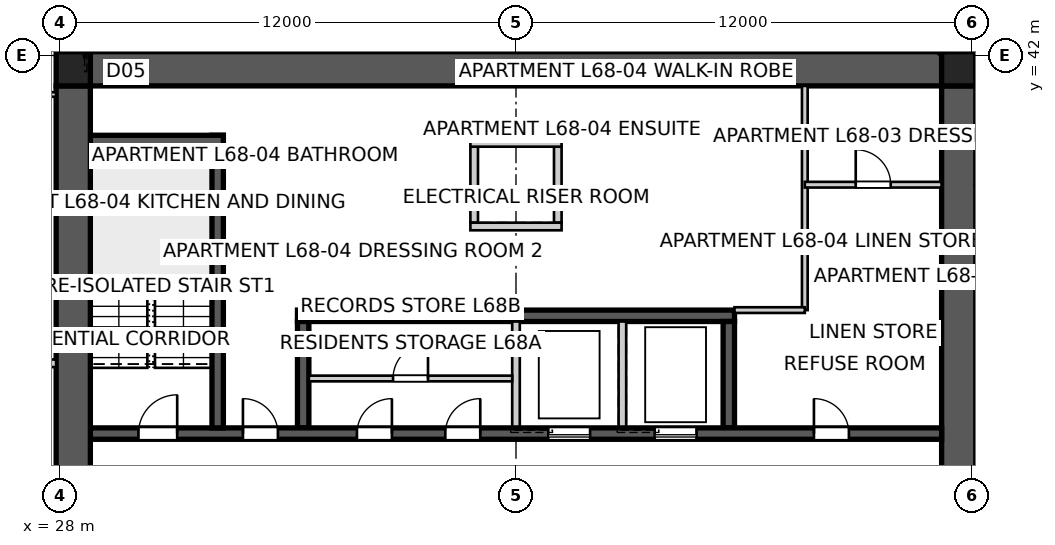
"""IFC4 building model, lengths in metres.
Left out: names, types, materials, properties, quantities, classifications, styles, units other than length and angle.
Written with IfcOpenShell. Run it as: python <this file> out.ifc"""

import sys

from ifc_helpers import new_model, si_unit, direction, frame, frame_2d, origin, origin_2d, place, context, subcontext, project, spatial, polyline, rectangle, outline, extrude, element, fill, save


model = new_model("IFC4")
c1 = context("Model", 3, precision=1e-05, world=origin(), true_north=direction((0.0, 1.0)))
c2 = subcontext(c1, "Body", "Model", "MODEL_VIEW")
j1 = project(units=[si_unit("LENGTHUNIT", "METRE"), si_unit("PLANEANGLEUNIT", "RADIAN")], contexts=[c1])
p1 = place(None, origin())
s1 = spatial("IfcSite", under=j1, at=p1, CompositionType="ELEMENT")
p2 = place(p1, origin())
s2 = spatial("IfcBuilding", under=s1, at=p2, CompositionType="ELEMENT")
p3 = place(p2, frame((0.0, 0.0, 247.2)))
s3 = spatial("IfcBuildingStorey", under=s2, at=p3, CompositionType="ELEMENT", Elevation=247.2)
p4 = place(p3, frame((28.8, 41.65, 0.0), z_axis=(0.0, 0.0, 1.0), x_axis=(1.0, 0.0, 0.0)))
e1 = element("IfcWall", 1, at=p4, inside=s3, PredefinedType="SHEAR", context=c2, shape_type="SweptSolid", body=[
    extrude(outline(polyline([(0.0, -0.45), (22.4, -0.45), (22.4, -0.025), (22.85, -0.025), (22.85, 0.025), (22.4, 0.025), (22.4, 0.45), (0.0, 0.45), (0.0, 0.025), (-0.45, 0.025), (-0.45, -0.025), (0.0, -0.025), (0.0, -0.45)])), origin(), (0.0, 0.0, 1.0), 3.4),
])
p5 = place(p3, frame((51.65, 18.8, 0.0), z_axis=(0.0, 0.0, 1.0), x_axis=(0.0, 1.0, 0.0)))
e2 = element("IfcWall", 2, at=p5, inside=s3, PredefinedType="SHEAR", context=c2, shape_type="SweptSolid", body=[
    extrude(outline(polyline([(0.0, -0.45), (22.4, -0.45), (22.4, -0.025), (22.85, -0.025), (22.85, 0.025), (22.4, 0.025), (22.4, 0.45), (0.0, 0.45), (0.0, 0.025), (-0.45, 0.025), (-0.45, -0.025), (0.0, -0.025), (0.0, -0.45)])), origin(), (0.0, 0.0, 1.0), 3.4),
])
p6 = place(p5, frame((11.14, 0.0, 0.0)))
e3 = element("IfcOpeningElement", 3, at=p6, cuts=e2, PredefinedType="OPENING", context=c2, shape_type="SweptSolid", body=[
    extrude(rectangle(XDim=1.02, YDim=2.4, at=frame_2d((0.51, 1.2))), frame((0.0, 0.46, 0.0), z_axis=(0.0, -1.0, 0.0), x_axis=(1.0, 0.0, 0.0)), (0.0, 0.0, 1.0), 0.92),
])
p7 = place(p3, frame((28.35, 41.2, 0.0), z_axis=(0.0, 0.0, 1.0), x_axis=(0.0, -1.0, 0.0)))
e4 = element("IfcWall", 4, at=p7, inside=s3, PredefinedType="SHEAR", context=c2, shape_type="SweptSolid", body=[
    extrude(outline(polyline([(0.0, -0.45), (22.4, -0.45), (22.4, -0.025), (22.85, -0.025), (22.85, 0.025), (22.4, 0.025), (22.4, 0.45), (0.0, 0.45), (0.0, 0.025), (-0.45, 0.025), (-0.45, -0.025), (0.0, -0.025), (0.0, -0.45)])), origin(), (0.0, 0.0, 1.0), 3.4),
])
p8 = place(p7, frame((11.14, 0.0, 0.0)))
e5 = element("IfcOpeningElement", 5, at=p8, cuts=e4, PredefinedType="OPENING", context=c2, shape_type="SweptSolid", body=[
    extrude(rectangle(XDim=1.02, YDim=2.4, at=frame_2d((0.51, 1.2))), frame((0.0, 0.46, 0.0), z_axis=(0.0, -1.0, 0.0), x_axis=(1.0, 0.0, 0.0)), (0.0, 0.0, 1.0), 0.92),
])
p9 = place(p3, frame((28.8, 32.05, 0.0), z_axis=(0.0, 0.0, 1.0), x_axis=(1.0, 0.0, 0.0)))
e6 = element("IfcWall", 6, at=p9, inside=s3, PredefinedType="SHEAR", context=c2, shape_type="SweptSolid", body=[
    extrude(rectangle(XDim=22.4, YDim=0.3, at=frame_2d((11.2, 0.0))), origin(), (0.0, 0.0, 1.0), 3.4),
])
p10 = place(p9, frame((19.04, 0.0, 0.0)))
e7 = element("IfcOpeningElement", 7, at=p10, cuts=e6, PredefinedType="OPENING", context=c2, shape_type="SweptSolid", body=[
    extrude(rectangle(XDim=0.92, YDim=2.1, at=frame_2d((0.46, 1.05))), frame((0.0, 0.16, 0.0), z_axis=(0.0, -1.0, 0.0), x_axis=(1.0, 0.0, 0.0)), (0.0, 0.0, 1.0), 0.32),
])
p11 = place(p9, frame((1.265, 0.0, 0.0)))
e8 = element("IfcOpeningElement", 8, at=p11, cuts=e6, PredefinedType="OPENING", context=c2, shape_type="SweptSolid", body=[
    extrude(rectangle(XDim=1.02, YDim=2.1, at=frame_2d((0.51, 1.05))), frame((0.0, 0.16, 0.0), z_axis=(0.0, -1.0, 0.0), x_axis=(1.0, 0.0, 0.0)), (0.0, 0.0, 1.0), 0.32),
])
p12 = place(p9, frame((4.015, 0.0, 0.0)))
e9 = element("IfcOpeningElement", 9, at=p12, cuts=e6, PredefinedType="OPENING", context=c2, shape_type="SweptSolid", body=[
    extrude(rectangle(XDim=0.92, YDim=2.1, at=frame_2d((0.46, 1.05))), frame((0.0, 0.16, 0.0), z_axis=(0.0, -1.0, 0.0), x_axis=(1.0, 0.0, 0.0)), (0.0, 0.0, 1.0), 0.32),
])
p13 = place(p9, frame((7.015, 0.0, 0.0)))
e10 = element("IfcOpeningElement", 10, at=p13, cuts=e6, PredefinedType="OPENING", context=c2, shape_type="SweptSolid", body=[
    extrude(rectangle(XDim=0.92, YDim=2.1, at=frame_2d((0.46, 1.05))), frame((0.0, 0.16, 0.0), z_axis=(0.0, -1.0, 0.0), x_axis=(1.0, 0.0, 0.0)), (0.0, 0.0, 1.0), 0.32),
])
p14 = place(p9, frame((9.34, 0.0, 0.0)))
e11 = element("IfcOpeningElement", 11, at=p14, cuts=e6, PredefinedType="OPENING", context=c2, shape_type="SweptSolid", body=[
    extrude(rectangle(XDim=0.92, YDim=2.1, at=frame_2d((0.46, 1.05))), frame((0.0, 0.16, 0.0), z_axis=(0.0, -1.0, 0.0), x_axis=(1.0, 0.0, 0.0)), (0.0, 0.0, 1.0), 0.32),
])
p15 = place(p9, frame((12.05, 0.0, 0.0)))
e12 = element("IfcOpeningElement", 12, at=p15, cuts=e6, PredefinedType="OPENING", context=c2, shape_type="SweptSolid", body=[
    extrude(rectangle(XDim=1.1, YDim=2.1, at=frame_2d((0.55, 1.05))), frame((0.0, 0.16, 0.0), z_axis=(0.0, -1.0, 0.0), x_axis=(1.0, 0.0, 0.0)), (0.0, 0.0, 1.0), 0.32),
])
p16 = place(p9, frame((14.85, 0.0, 0.0)))
e13 = element("IfcOpeningElement", 13, at=p16, cuts=e6, PredefinedType="OPENING", context=c2, shape_type="SweptSolid", body=[
    extrude(rectangle(XDim=1.1, YDim=2.1, at=frame_2d((0.55, 1.05))), frame((0.0, 0.16, 0.0), z_axis=(0.0, -1.0, 0.0), x_axis=(1.0, 0.0, 0.0)), (0.0, 0.0, 1.0), 0.32),
])
p17 = place(p3, frame((34.25, 35.15, 0.0), z_axis=(0.0, 0.0, 1.0), x_axis=(1.0, 0.0, 0.0)))
e14 = element("IfcWall", 14, at=p17, inside=s3, PredefinedType="SHEAR", context=c2, shape_type="SweptSolid", body=[
    extrude(rectangle(XDim=11.5, YDim=0.3, at=frame_2d((5.75, 0.0))), origin(), (0.0, 0.0, 1.0), 3.4),
])
p18 = place(p3, frame((34.4, 32.2, 0.0), z_axis=(0.0, 0.0, 1.0), x_axis=(0.0, 1.0, 0.0)))
e15 = element("IfcWall", 15, at=p18, inside=s3, PredefinedType="SHEAR", context=c2, shape_type="SweptSolid", body=[
    extrude(rectangle(XDim=2.8, YDim=0.3, at=frame_2d((1.4, 0.0))), origin(), (0.0, 0.0, 1.0), 3.4),
])
for number, where, z_axis, x_axis in (
    (16, (40.0, 32.2, 0.0), (0.0, 0.0, 1.0), (0.0, 1.0, 0.0)),
    (17, (42.8, 32.2, 0.0), (0.0, 0.0, 1.0), (0.0, 1.0, 0.0)),
):
    element("IfcWall", number, at=place(p3, frame(where, z_axis=z_axis, x_axis=x_axis)), inside=s3, PredefinedType="SOLIDWALL", context=c2, shape_type="SweptSolid", body=[
        extrude(rectangle(XDim=2.8, YDim=0.2, at=frame_2d((1.4, 0.0))), origin(), (0.0, 0.0, 1.0), 3.4),
    ])
p19 = place(p3, frame((45.6, 32.2, 0.0), z_axis=(0.0, 0.0, 1.0), x_axis=(0.0, 1.0, 0.0)))
e18 = element("IfcWall", 18, at=p19, inside=s3, PredefinedType="SHEAR", context=c2, shape_type="SweptSolid", body=[
    extrude(rectangle(XDim=2.8, YDim=0.3, at=frame_2d((1.4, 0.0))), origin(), (0.0, 0.0, 1.0), 3.4),
])
p20 = place(p3, frame((32.15, 32.2, 0.0), z_axis=(0.0, 0.0, 1.0), x_axis=(0.0, 1.0, 0.0)))
e19 = element("IfcWall", 19, at=p20, inside=s3, PredefinedType="SHEAR", context=c2, shape_type="SweptSolid", body=[
    extrude(rectangle(XDim=7.7, YDim=0.3, at=frame_2d((3.85, 0.0))), origin(), (0.0, 0.0, 1.0), 3.4),
])
p21 = place(p3, frame((28.8, 39.75, 0.0), z_axis=(0.0, 0.0, 1.0), x_axis=(1.0, 0.0, 0.0)))
e20 = element("IfcWall", 20, at=p21, inside=s3, PredefinedType="SHEAR", context=c2, shape_type="SweptSolid", body=[
    extrude(rectangle(XDim=3.5, YDim=0.3, at=frame_2d((1.75, 0.0))), origin(), (0.0, 0.0, 1.0), 3.4),
])
for number, where, z_axis, x_axis in (
    (21, (38.9, 37.6, 0.0), (0.0, 0.0, 1.0), (0.0, 1.0, 0.0)),
    (22, (41.1, 37.6, 0.0), (0.0, 0.0, 1.0), (0.0, 1.0, 0.0)),
):
    element("IfcWall", number, at=place(p3, frame(where, z_axis=z_axis, x_axis=x_axis)), inside=s3, PredefinedType="SOLIDWALL", context=c2, shape_type="SweptSolid", body=[
        extrude(rectangle(XDim=2.0, YDim=0.2, at=frame_2d((1.0, 0.0))), origin(), (0.0, 0.0, 1.0), 3.4),
    ])
for number, where, z_axis, x_axis in (
    (23, (38.8, 37.5, 0.0), (0.0, 0.0, 1.0), (1.0, 0.0, 0.0)),
    (24, (38.8, 39.7, 0.0), (0.0, 0.0, 1.0), (1.0, 0.0, 0.0)),
):
    element("IfcWall", number, at=place(p3, frame(where, z_axis=z_axis, x_axis=x_axis)), inside=s3, PredefinedType="SOLIDWALL", context=c2, shape_type="SweptSolid", body=[
        extrude(rectangle(XDim=2.4, YDim=0.2, at=frame_2d((1.2, 0.0))), origin(), (0.0, 0.0, 1.0), 3.4),
    ])
for number, where, z_axis, x_axis in (
    (25, (51.65, 41.65, 0.0), (0.0, 0.0, 1.0), (1.0, 0.0, 0.0)),
    (26, (28.35, 41.65, 0.0), (0.0, 0.0, 1.0), (1.0, 0.0, 0.0)),
):
    element("IfcColumn", number, at=place(p3, frame(where, z_axis=z_axis, x_axis=x_axis)), inside=s3, PredefinedType="COLUMN", context=c2, shape_type="SweptSolid", body=[
        extrude(rectangle(XDim=0.9, YDim=0.9, at=origin_2d()), origin(), (0.0, 0.0, 1.0), 3.4),
    ])
p22 = place(p3, frame((27.9, 33.9, 0.0), z_axis=(0.0, 0.0, 1.0), x_axis=(-1.0, 0.0, 0.0)))
e27 = element("IfcWall", 27, at=p22, inside=s3, PredefinedType="PARTITIONING", context=c2, shape_type="SweptSolid", body=[
    extrude(rectangle(XDim=2.5, YDim=0.2, at=frame_2d((1.25, 0.0))), origin(), (0.0, 0.0, 1.0), 3.25),
])
p23 = place(p3, frame((57.612, 42.332, 0.0), z_axis=(0.0, 0.0, 1.0), x_axis=(-0.819161528122, -0.573562891796, 0.0)))
e28 = element("IfcWall", 28, at=p23, inside=s3, PredefinedType="PARTITIONING", context=c2, shape_type="SweptSolid", body=[
    extrude(rectangle(XDim=6.681, YDim=0.25, at=frame_2d((3.341, 0.0))), origin(), (0.0, 0.0, 1.0), 3.25),
])
p24 = place(p3, frame((47.6, 41.2, 0.0), z_axis=(0.0, 0.0, 1.0), x_axis=(0.0, -1.0, 0.0)))
e29 = element("IfcWall", 29, at=p24, inside=s3, PredefinedType="SOLIDWALL", context=c2, shape_type="SweptSolid", body=[
    extrude(rectangle(XDim=5.9, YDim=0.15, at=frame_2d((2.95, 0.0))), origin(), (0.0, 0.0, 1.0), 3.25),
])
p25 = place(p3, frame((47.6, 35.3, 0.0), z_axis=(0.0, 0.0, 1.0), x_axis=(-1.0, 0.0, 0.0)))
e30 = element("IfcWall", 30, at=p25, inside=s3, PredefinedType="SOLIDWALL", context=c2, shape_type="SweptSolid", body=[
    extrude(rectangle(XDim=1.85, YDim=0.15, at=frame_2d((0.925, 0.0))), origin(), (0.0, 0.0, 1.0), 3.25),
])
p26 = place(p3, frame((47.6, 38.6, 0.0), z_axis=(0.0, 0.0, 1.0), x_axis=(1.0, 0.0, 0.0)))
e31 = element("IfcWall", 31, at=p26, inside=s3, PredefinedType="SOLIDWALL", context=c2, shape_type="SweptSolid", body=[
    extrude(rectangle(XDim=3.6, YDim=0.15, at=frame_2d((1.8, 0.0))), origin(), (0.0, 0.0, 1.0), 3.25),
])
p27 = place(p26, frame((1.34, 0.0, 0.0)))
e32 = element("IfcOpeningElement", 32, at=p27, cuts=e31, PredefinedType="OPENING", context=c2, shape_type="SweptSolid", body=[
    extrude(rectangle(XDim=0.92, YDim=2.1, at=frame_2d((0.46, 1.05))), frame((0.0, 0.085, 0.0), z_axis=(0.0, -1.0, 0.0), x_axis=(1.0, 0.0, 0.0)), (0.0, 0.0, 1.0), 0.17),
])
p28 = place(p3, frame((23.0, 36.145, 0.0), z_axis=(0.0, 0.0, 1.0), x_axis=(1.0, 0.0, 0.0)))
e33 = element("IfcWall", 33, at=p28, inside=s3, PredefinedType="PARTITIONING", context=c2, shape_type="SweptSolid", body=[
    extrude(rectangle(XDim=4.9, YDim=0.12, at=frame_2d((2.45, 0.0))), origin(), (0.0, 0.0, 1.0), 3.25),
])
p29 = place(p28, frame((1.99, 0.0, 0.0)))
e34 = element("IfcOpeningElement", 34, at=p29, cuts=e33, PredefinedType="OPENING", context=c2, shape_type="SweptSolid", body=[
    extrude(rectangle(XDim=0.92, YDim=2.34, at=frame_2d((0.46, 1.17))), frame((0.0, 0.07, 0.0), z_axis=(0.0, -1.0, 0.0), x_axis=(1.0, 0.0, 0.0)), (0.0, 0.0, 1.0), 0.14),
])
p30 = place(p3, frame((23.0, 40.974, 0.0), z_axis=(0.0, 0.0, 1.0), x_axis=(1.0, 0.0, 0.0)))
e35 = element("IfcWall", 35, at=p30, inside=s3, PredefinedType="PARTITIONING", context=c2, shape_type="SweptSolid", body=[
    extrude(rectangle(XDim=4.9, YDim=0.12, at=frame_2d((2.45, 0.0))), origin(), (0.0, 0.0, 1.0), 3.25),
])
p31 = place(p30, frame((1.97, 0.0, 0.0)))
e36 = element("IfcOpeningElement", 36, at=p31, cuts=e35, PredefinedType="OPENING", context=c2, shape_type="SweptSolid", body=[
    extrude(rectangle(XDim=0.96, YDim=2.1, at=frame_2d((0.48, 1.05))), frame((0.0, 0.07, 0.0), z_axis=(0.0, -1.0, 0.0), x_axis=(1.0, 0.0, 0.0)), (0.0, 0.0, 1.0), 0.14),
])
p32 = place(p3, frame((28.708, 41.18, 0.0), z_axis=(0.0, 0.0, 1.0), x_axis=(0.0, 1.0, 0.0)))
e37 = element("IfcWall", 37, at=p32, inside=s3, PredefinedType="PARTITIONING", context=c2, shape_type="SweptSolid", body=[
    extrude(rectangle(XDim=2.458, YDim=0.12, at=frame_2d((1.229, 0.0))), origin(), (0.0, 0.0, 1.0), 3.25),
])
p33 = place(p32, frame((1.259, 0.0, 0.0)))
e38 = element("IfcOpeningElement", 38, at=p33, cuts=e37, PredefinedType="OPENING", context=c2, shape_type="SweptSolid", body=[
    extrude(rectangle(XDim=0.96, YDim=2.1, at=frame_2d((0.48, 1.05))), frame((0.0, 0.07, 0.0), z_axis=(0.0, -1.0, 0.0), x_axis=(1.0, 0.0, 0.0)), (0.0, 0.0, 1.0), 0.14),
])
p34 = place(p3, frame((55.537, 45.226, 0.0), z_axis=(0.0, 0.0, 1.0), x_axis=(-0.819158250207, -0.573567573279, 0.0)))
e39 = element("IfcWall", 39, at=p34, inside=s3, PredefinedType="SOLIDWALL", context=c2, shape_type="SweptSolid", body=[
    extrude(rectangle(XDim=5.45, YDim=0.15, at=frame_2d((2.725, 0.0))), origin(), (0.0, 0.0, 1.0), 3.25),
])
p35 = place(p34, frame((2.245, 0.0, 0.0)))
e40 = element("IfcOpeningElement", 40, at=p35, cuts=e39, PredefinedType="OPENING", context=c2, shape_type="SweptSolid", body=[
    extrude(rectangle(XDim=0.92, YDim=2.34, at=frame_2d((0.46, 1.17))), frame((0.0, 0.085, 0.0), z_axis=(0.0, -1.0, 0.0), x_axis=(1.0, 0.0, 0.0)), (0.0, 0.0, 1.0), 0.17),
])
p36 = place(p3, frame((34.55, 33.5, 0.0), z_axis=(0.0, 0.0, 1.0), x_axis=(1.0, 0.0, 0.0)))
e41 = element("IfcWall", 41, at=p36, inside=s3, PredefinedType="SOLIDWALL", context=c2, shape_type="SweptSolid", body=[
    extrude(rectangle(XDim=5.35, YDim=0.15, at=frame_2d((2.675, 0.0))), origin(), (0.0, 0.0, 1.0), 3.25),
])
p37 = place(p36, frame((2.215, 0.0, 0.0)))
e42 = element("IfcOpeningElement", 42, at=p37, cuts=e41, PredefinedType="OPENING", context=c2, shape_type="SweptSolid", body=[
    extrude(rectangle(XDim=0.92, YDim=2.1, at=frame_2d((0.46, 1.05))), frame((0.0, 0.085, 0.0), z_axis=(0.0, -1.0, 0.0), x_axis=(1.0, 0.0, 0.0)), (0.0, 0.0, 1.0), 0.17),
])
p38 = place(p10, origin())
e43 = element("IfcDoor", 43, at=p38, inside=s3, OperationType="SINGLE_SWING_LEFT", PredefinedType="DOOR", context=c2, shape_type="SweptSolid", body=[
    extrude(rectangle(XDim=0.92, YDim=2.1, at=frame_2d((0.46, 1.05))), frame((0.0, 0.025, 0.0), z_axis=(0.0, -1.0, 0.0), x_axis=(1.0, 0.0, 0.0)), (0.0, 0.0, 1.0), 0.05),
])
fill(e7, e43)
p39 = place(p11, origin())
e44 = element("IfcDoor", 44, at=p39, inside=s3, OperationType="SINGLE_SWING_RIGHT", PredefinedType="DOOR", context=c2, shape_type="SweptSolid", body=[
    extrude(rectangle(XDim=1.02, YDim=2.1, at=frame_2d((0.51, 1.05))), frame((0.0, 0.025, 0.0), z_axis=(0.0, -1.0, 0.0), x_axis=(1.0, 0.0, 0.0)), (0.0, 0.0, 1.0), 0.05),
])
fill(e8, e44)
p40 = place(p12, origin())
e45 = element("IfcDoor", 45, at=p40, inside=s3, OperationType="SINGLE_SWING_LEFT", PredefinedType="DOOR", context=c2, shape_type="SweptSolid", body=[
    extrude(rectangle(XDim=0.92, YDim=2.1, at=frame_2d((0.46, 1.05))), frame((0.0, 0.025, 0.0), z_axis=(0.0, -1.0, 0.0), x_axis=(1.0, 0.0, 0.0)), (0.0, 0.0, 1.0), 0.05),
])
fill(e9, e45)
p41 = place(p27, origin())
e46 = element("IfcDoor", 46, at=p41, inside=s3, OperationType="SINGLE_SWING_LEFT", PredefinedType="DOOR", context=c2, shape_type="SweptSolid", body=[
    extrude(rectangle(XDim=0.92, YDim=2.1, at=frame_2d((0.46, 1.05))), frame((0.0, 0.025, 0.0), z_axis=(0.0, -1.0, 0.0), x_axis=(1.0, 0.0, 0.0)), (0.0, 0.0, 1.0), 0.05),
])
fill(e32, e46)
p42 = place(p13, origin())
e47 = element("IfcDoor", 47, at=p42, inside=s3, OperationType="SINGLE_SWING_RIGHT", PredefinedType="DOOR", context=c2, shape_type="SweptSolid", body=[
    extrude(rectangle(XDim=0.92, YDim=2.1, at=frame_2d((0.46, 1.05))), frame((0.0, 0.025, 0.0), z_axis=(0.0, -1.0, 0.0), x_axis=(1.0, 0.0, 0.0)), (0.0, 0.0, 1.0), 0.05),
])
fill(e10, e47)
p43 = place(p14, origin())
e48 = element("IfcDoor", 48, at=p43, inside=s3, OperationType="SINGLE_SWING_RIGHT", PredefinedType="DOOR", context=c2, shape_type="SweptSolid", body=[
    extrude(rectangle(XDim=0.92, YDim=2.1, at=frame_2d((0.46, 1.05))), frame((0.0, 0.025, 0.0), z_axis=(0.0, -1.0, 0.0), x_axis=(1.0, 0.0, 0.0)), (0.0, 0.0, 1.0), 0.05),
])
fill(e11, e48)
p44 = place(p37, origin())
e49 = element("IfcDoor", 49, at=p44, inside=s3, OperationType="SINGLE_SWING_RIGHT", PredefinedType="DOOR", context=c2, shape_type="SweptSolid", body=[
    extrude(rectangle(XDim=0.92, YDim=2.1, at=frame_2d((0.46, 1.05))), frame((0.0, 0.025, 0.0), z_axis=(0.0, -1.0, 0.0), x_axis=(1.0, 0.0, 0.0)), (0.0, 0.0, 1.0), 0.05),
])
fill(e42, e49)
p45 = place(p15, origin())
e50 = element("IfcDoor", 50, at=p45, inside=s3, OperationType="SLIDING_TO_LEFT", PredefinedType="DOOR", context=c2, shape_type="SweptSolid", body=[
    extrude(rectangle(XDim=1.1, YDim=2.1, at=frame_2d((0.55, 1.05))), frame((0.0, 0.025, 0.0), z_axis=(0.0, -1.0, 0.0), x_axis=(1.0, 0.0, 0.0)), (0.0, 0.0, 1.0), 0.05),
])
fill(e12, e50)
p46 = place(p16, origin())
e51 = element("IfcDoor", 51, at=p46, inside=s3, OperationType="SLIDING_TO_LEFT", PredefinedType="DOOR", context=c2, shape_type="SweptSolid", body=[
    extrude(rectangle(XDim=1.1, YDim=2.1, at=frame_2d((0.55, 1.05))), frame((0.0, 0.025, 0.0), z_axis=(0.0, -1.0, 0.0), x_axis=(1.0, 0.0, 0.0)), (0.0, 0.0, 1.0), 0.05),
])
fill(e13, e51)
save(model, sys.argv[1])
